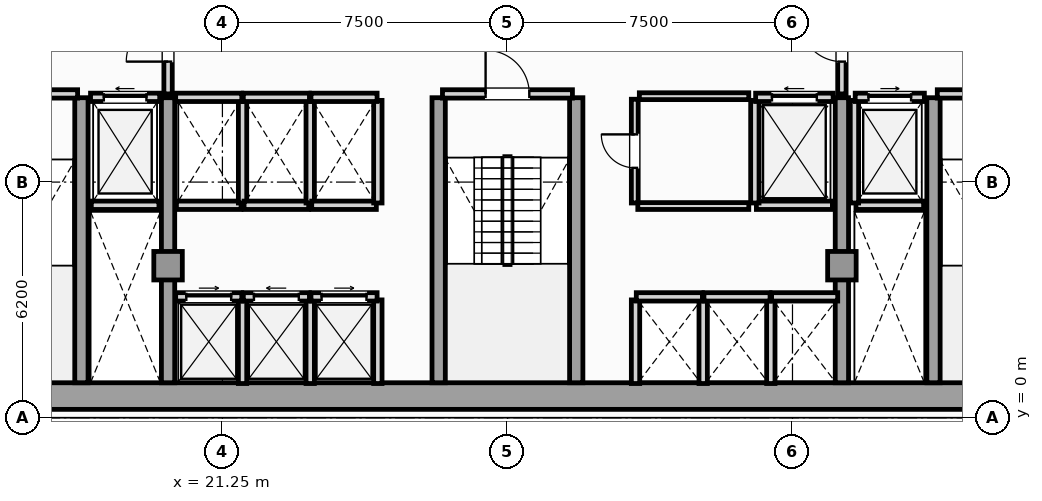
"""IFC4 building model, lengths in metres.
Left out: names, types, materials, properties, quantities, classifications, styles, units other than length and angle.
Written with IfcOpenShell. Run it as: python <this file> out.ifc"""

import sys

from ifc_helpers import new_model, si_unit, direction, frame, frame_2d, origin, origin_2d, place, context, subcontext, project, spatial, rectangle, extrude, element, fill, save


model = new_model("IFC4")
c1 = context("Model", 3, precision=1e-05, world=origin(), true_north=direction((0.0, 1.0)))
c2 = subcontext(c1, "Body", "Model", "MODEL_VIEW")
j1 = project(units=[si_unit("LENGTHUNIT", "METRE"), si_unit("PLANEANGLEUNIT", "RADIAN")], contexts=[c1])
p1 = place(None, origin())
s1 = spatial("IfcSite", under=j1, at=p1, CompositionType="ELEMENT")
p2 = place(p1, origin())
s2 = spatial("IfcBuilding", under=s1, at=p2, CompositionType="ELEMENT")
p3 = place(p2, frame((0.0, 0.0, 92.6)))
s3 = spatial("IfcBuildingStorey", under=s2, at=p3, CompositionType="ELEMENT", Elevation=92.6)
p4 = place(p3, frame((13.25, 0.57, 0.0), z_axis=(0.0, 0.0, 1.0), x_axis=(1.0, 0.0, 0.0)))
e1 = element("IfcWall", 1, at=p4, inside=s3, PredefinedType="SHEAR", context=c2, shape_type="SweptSolid", body=[
    extrude(rectangle(XDim=31.0, YDim=0.7, at=frame_2d((15.5, 0.0))), origin(), (0.0, 0.0, 1.0), 3.6),
])
for number, where, z_axis, x_axis in (
    (2, (17.54, 0.92, 0.0), (0.0, 0.0, 1.0), (0.0, 1.0, 0.0)),
    (3, (19.82, 0.92, 0.0), (0.0, 0.0, 1.0), (0.0, 1.0, 0.0)),
    (4, (26.94, 0.92, 0.0), (0.0, 0.0, 1.0), (0.0, 1.0, 0.0)),
    (5, (30.56, 0.92, 0.0), (0.0, 0.0, 1.0), (0.0, 1.0, 0.0)),
    (6, (37.55, 0.92, 0.0), (0.0, 0.0, 1.0), (0.0, 1.0, 0.0)),
    (7, (39.96, 0.92, 0.0), (0.0, 0.0, 1.0), (0.0, 1.0, 0.0)),
):
    element("IfcWall", number, at=place(p3, frame(where, z_axis=z_axis, x_axis=x_axis)), inside=s3, PredefinedType="SHEAR", context=c2, shape_type="SweptSolid", body=[
        extrude(rectangle(XDim=7.5, YDim=0.35, at=frame_2d((3.75, 0.0))), origin(), (0.0, 0.0, 1.0), 3.6),
    ])
for number, where, z_axis, x_axis in (
    (8, (19.82, 4.0, 0.0), (0.0, 0.0, 1.0), (1.0, 0.0, 0.0)),
    (9, (37.55, 4.0, 0.0), (0.0, 0.0, 1.0), (1.0, 0.0, 0.0)),
):
    element("IfcColumn", number, at=place(p3, frame(where, z_axis=z_axis, x_axis=x_axis)), inside=s3, PredefinedType="COLUMN", context=c2, shape_type="SweptSolid", body=[
        extrude(rectangle(XDim=0.75, YDim=0.75, at=origin_2d()), origin(), (0.0, 0.0, 1.0), 3.85),
    ])
p5 = place(p3, frame((17.8, 5.59, 0.0), z_axis=(0.0, 0.0, 1.0), x_axis=(1.0, 0.0, 0.0)))
e10 = element("IfcWall", 10, at=p5, inside=s3, PredefinedType="SOLIDWALL", context=c2, shape_type="SweptSolid", body=[
    extrude(rectangle(XDim=1.78, YDim=0.22, at=frame_2d((0.89, 0.0))), origin(), (0.0, 0.0, 1.0), 3.6),
])
p6 = place(p3, frame((17.78, 8.43, 0.0), z_axis=(0.0, 0.0, 1.0), x_axis=(1.0, 0.0, 0.0)))
e11 = element("IfcWall", 11, at=p6, inside=s3, PredefinedType="SOLIDWALL", context=c2, shape_type="SweptSolid", body=[
    extrude(rectangle(XDim=1.82, YDim=0.22, at=frame_2d((0.91, 0.0))), origin(), (0.0, 0.0, 1.0), 3.6),
])
p7 = place(p6, frame((0.35, 0.0, 0.0)))
e12 = element("IfcOpeningElement", 12, at=p7, cuts=e11, PredefinedType="OPENING", context=c2, shape_type="SweptSolid", body=[
    extrude(rectangle(XDim=1.12, YDim=2.25, at=frame_2d((0.56, 1.125))), frame((0.0, 0.12, 0.0), z_axis=(0.0, -1.0, 0.0), x_axis=(1.0, 0.0, 0.0)), (0.0, 0.0, 1.0), 0.24),
])
p8 = place(p3, frame((37.92, 5.59, 0.0), z_axis=(0.0, 0.0, 1.0), x_axis=(1.0, 0.0, 0.0)))
e13 = element("IfcWall", 13, at=p8, inside=s3, PredefinedType="SOLIDWALL", context=c2, shape_type="SweptSolid", body=[
    extrude(rectangle(XDim=1.78, YDim=0.22, at=frame_2d((0.89, 0.0))), origin(), (0.0, 0.0, 1.0), 3.6),
])
p9 = place(p3, frame((37.88, 5.65, 0.0), z_axis=(0.0, 0.0, 1.0), x_axis=(0.0, 1.0, 0.0)))
e14 = element("IfcWall", 14, at=p9, inside=s3, PredefinedType="SOLIDWALL", context=c2, shape_type="SweptSolid", body=[
    extrude(rectangle(XDim=2.7, YDim=0.22, at=frame_2d((1.35, 0.0))), origin(), (0.0, 0.0, 1.0), 3.6),
])
p10 = place(p3, frame((37.9, 8.43, 0.0), z_axis=(0.0, 0.0, 1.0), x_axis=(1.0, 0.0, 0.0)))
e15 = element("IfcWall", 15, at=p10, inside=s3, PredefinedType="SOLIDWALL", context=c2, shape_type="SweptSolid", body=[
    extrude(rectangle(XDim=1.82, YDim=0.22, at=frame_2d((0.91, 0.0))), origin(), (0.0, 0.0, 1.0), 3.6),
])
p11 = place(p10, frame((0.35, 0.0, 0.0)))
e16 = element("IfcOpeningElement", 16, at=p11, cuts=e15, PredefinedType="OPENING", context=c2, shape_type="SweptSolid", body=[
    extrude(rectangle(XDim=1.12, YDim=2.25, at=frame_2d((0.56, 1.125))), frame((0.0, 0.12, 0.0), z_axis=(0.0, -1.0, 0.0), x_axis=(1.0, 0.0, 0.0)), (0.0, 0.0, 1.0), 0.24),
])
p12 = place(p3, frame((35.3, 5.59, 0.0), z_axis=(0.0, 0.0, 1.0), x_axis=(1.0, 0.0, 0.0)))
e17 = element("IfcWall", 17, at=p12, inside=s3, PredefinedType="SOLIDWALL", context=c2, shape_type="SweptSolid", body=[
    extrude(rectangle(XDim=2.0, YDim=0.22, at=frame_2d((1.0, 0.0))), origin(), (0.0, 0.0, 1.0), 3.6),
])
p13 = place(p3, frame((35.26, 5.65, 0.0), z_axis=(0.0, 0.0, 1.0), x_axis=(0.0, 1.0, 0.0)))
e18 = element("IfcWall", 18, at=p13, inside=s3, PredefinedType="SOLIDWALL", context=c2, shape_type="SweptSolid", body=[
    extrude(rectangle(XDim=2.7, YDim=0.22, at=frame_2d((1.35, 0.0))), origin(), (0.0, 0.0, 1.0), 3.6),
])
p14 = place(p3, frame((35.28, 8.43, 0.0), z_axis=(0.0, 0.0, 1.0), x_axis=(1.0, 0.0, 0.0)))
e19 = element("IfcWall", 19, at=p14, inside=s3, PredefinedType="SOLIDWALL", context=c2, shape_type="SweptSolid", body=[
    extrude(rectangle(XDim=2.04, YDim=0.22, at=frame_2d((1.02, 0.0))), origin(), (0.0, 0.0, 1.0), 3.6),
])
p15 = place(p14, frame((0.43, 0.0, 0.0)))
e20 = element("IfcOpeningElement", 20, at=p15, cuts=e19, PredefinedType="OPENING", context=c2, shape_type="SweptSolid", body=[
    extrude(rectangle(XDim=1.18, YDim=2.2, at=frame_2d((0.59, 1.1))), frame((0.0, 0.12, 0.0), z_axis=(0.0, -1.0, 0.0), x_axis=(1.0, 0.0, 0.0)), (0.0, 0.0, 1.0), 0.24),
])
p16 = place(p3, frame((21.78, 0.9, 0.0), z_axis=(0.0, 0.0, 1.0), x_axis=(0.0, 1.0, 0.0)))
e21 = element("IfcWall", 21, at=p16, inside=s3, PredefinedType="SOLIDWALL", context=c2, shape_type="SweptSolid", body=[
    extrude(rectangle(XDim=2.2, YDim=0.22, at=frame_2d((1.1, 0.0))), origin(), (0.0, 0.0, 1.0), 3.6),
])
p17 = place(p3, frame((20.02, 3.18, 0.0), z_axis=(0.0, 0.0, 1.0), x_axis=(1.0, 0.0, 0.0)))
e22 = element("IfcWall", 22, at=p17, inside=s3, PredefinedType="SOLIDWALL", context=c2, shape_type="SweptSolid", body=[
    extrude(rectangle(XDim=1.74, YDim=0.22, at=frame_2d((0.87, 0.0))), origin(), (0.0, 0.0, 1.0), 3.6),
])
p18 = place(p17, frame((0.28, 0.0, 0.0)))
e23 = element("IfcOpeningElement", 23, at=p18, cuts=e22, PredefinedType="OPENING", context=c2, shape_type="SweptSolid", body=[
    extrude(rectangle(XDim=1.18, YDim=2.2, at=frame_2d((0.59, 1.1))), frame((0.0, 0.12, 0.0), z_axis=(0.0, -1.0, 0.0), x_axis=(1.0, 0.0, 0.0)), (0.0, 0.0, 1.0), 0.24),
])
p19 = place(p3, frame((23.56, 0.9, 0.0), z_axis=(0.0, 0.0, 1.0), x_axis=(0.0, 1.0, 0.0)))
e24 = element("IfcWall", 24, at=p19, inside=s3, PredefinedType="SOLIDWALL", context=c2, shape_type="SweptSolid", body=[
    extrude(rectangle(XDim=2.2, YDim=0.22, at=frame_2d((1.1, 0.0))), origin(), (0.0, 0.0, 1.0), 3.6),
])
p20 = place(p3, frame((21.8, 3.18, 0.0), z_axis=(0.0, 0.0, 1.0), x_axis=(1.0, 0.0, 0.0)))
e25 = element("IfcWall", 25, at=p20, inside=s3, PredefinedType="SOLIDWALL", context=c2, shape_type="SweptSolid", body=[
    extrude(rectangle(XDim=1.74, YDim=0.22, at=frame_2d((0.87, 0.0))), origin(), (0.0, 0.0, 1.0), 3.6),
])
p21 = place(p20, frame((0.28, 0.0, 0.0)))
e26 = element("IfcOpeningElement", 26, at=p21, cuts=e25, PredefinedType="OPENING", context=c2, shape_type="SweptSolid", body=[
    extrude(rectangle(XDim=1.18, YDim=2.2, at=frame_2d((0.59, 1.1))), frame((0.0, 0.12, 0.0), z_axis=(0.0, -1.0, 0.0), x_axis=(1.0, 0.0, 0.0)), (0.0, 0.0, 1.0), 0.24),
])
p22 = place(p3, frame((25.34, 0.9, 0.0), z_axis=(0.0, 0.0, 1.0), x_axis=(0.0, 1.0, 0.0)))
e27 = element("IfcWall", 27, at=p22, inside=s3, PredefinedType="SOLIDWALL", context=c2, shape_type="SweptSolid", body=[
    extrude(rectangle(XDim=2.2, YDim=0.22, at=frame_2d((1.1, 0.0))), origin(), (0.0, 0.0, 1.0), 3.6),
])
p23 = place(p3, frame((23.58, 3.18, 0.0), z_axis=(0.0, 0.0, 1.0), x_axis=(1.0, 0.0, 0.0)))
e28 = element("IfcWall", 28, at=p23, inside=s3, PredefinedType="SOLIDWALL", context=c2, shape_type="SweptSolid", body=[
    extrude(rectangle(XDim=1.74, YDim=0.22, at=frame_2d((0.87, 0.0))), origin(), (0.0, 0.0, 1.0), 3.6),
])
p24 = place(p23, frame((0.28, 0.0, 0.0)))
e29 = element("IfcOpeningElement", 29, at=p24, cuts=e28, PredefinedType="OPENING", context=c2, shape_type="SweptSolid", body=[
    extrude(rectangle(XDim=1.18, YDim=2.2, at=frame_2d((0.59, 1.1))), frame((0.0, 0.12, 0.0), z_axis=(0.0, -1.0, 0.0), x_axis=(1.0, 0.0, 0.0)), (0.0, 0.0, 1.0), 0.24),
])
for number, where, z_axis, x_axis in (
    (30, (32.12, 0.9, 0.0), (0.0, 0.0, 1.0), (0.0, 1.0, 0.0)),
    (31, (33.9, 0.9, 0.0), (0.0, 0.0, 1.0), (0.0, 1.0, 0.0)),
):
    element("IfcWall", number, at=place(p3, frame(where, z_axis=z_axis, x_axis=x_axis)), inside=s3, PredefinedType="SOLIDWALL", context=c2, shape_type="SweptSolid", body=[
        extrude(rectangle(XDim=2.2, YDim=0.22, at=frame_2d((1.1, 0.0))), origin(), (0.0, 0.0, 1.0), 3.6),
    ])
p25 = place(p3, frame((32.14, 3.18, 0.0), z_axis=(0.0, 0.0, 1.0), x_axis=(1.0, 0.0, 0.0)))
e32 = element("IfcWall", 32, at=p25, inside=s3, PredefinedType="SOLIDWALL", context=c2, shape_type="SweptSolid", body=[
    extrude(rectangle(XDim=1.74, YDim=0.22, at=frame_2d((0.87, 0.0))), origin(), (0.0, 0.0, 1.0), 3.6),
])
p26 = place(p3, frame((35.68, 0.9, 0.0), z_axis=(0.0, 0.0, 1.0), x_axis=(0.0, 1.0, 0.0)))
e33 = element("IfcWall", 33, at=p26, inside=s3, PredefinedType="SOLIDWALL", context=c2, shape_type="SweptSolid", body=[
    extrude(rectangle(XDim=2.2, YDim=0.22, at=frame_2d((1.1, 0.0))), origin(), (0.0, 0.0, 1.0), 3.6),
])
for number, where, z_axis, x_axis in (
    (34, (33.92, 3.18, 0.0), (0.0, 0.0, 1.0), (1.0, 0.0, 0.0)),
    (35, (35.7, 3.18, 0.0), (0.0, 0.0, 1.0), (1.0, 0.0, 0.0)),
):
    element("IfcWall", number, at=place(p3, frame(where, z_axis=z_axis, x_axis=x_axis)), inside=s3, PredefinedType="SOLIDWALL", context=c2, shape_type="SweptSolid", body=[
        extrude(rectangle(XDim=1.74, YDim=0.22, at=frame_2d((0.87, 0.0))), origin(), (0.0, 0.0, 1.0), 3.6),
    ])
p27 = place(p3, frame((20.04, 5.59, 0.0), z_axis=(0.0, 0.0, 1.0), x_axis=(1.0, 0.0, 0.0)))
e36 = element("IfcWall", 36, at=p27, inside=s3, PredefinedType="SOLIDWALL", context=c2, shape_type="SweptSolid", body=[
    extrude(rectangle(XDim=1.7, YDim=0.22, at=frame_2d((0.85, 0.0))), origin(), (0.0, 0.0, 1.0), 3.6),
])
p28 = place(p3, frame((21.78, 5.65, 0.0), z_axis=(0.0, 0.0, 1.0), x_axis=(0.0, 1.0, 0.0)))
e37 = element("IfcWall", 37, at=p28, inside=s3, PredefinedType="SOLIDWALL", context=c2, shape_type="SweptSolid", body=[
    extrude(rectangle(XDim=2.7, YDim=0.22, at=frame_2d((1.35, 0.0))), origin(), (0.0, 0.0, 1.0), 3.6),
])
p29 = place(p3, frame((20.02, 8.43, 0.0), z_axis=(0.0, 0.0, 1.0), x_axis=(1.0, 0.0, 0.0)))
e38 = element("IfcWall", 38, at=p29, inside=s3, PredefinedType="SOLIDWALL", context=c2, shape_type="SweptSolid", body=[
    extrude(rectangle(XDim=1.74, YDim=0.22, at=frame_2d((0.87, 0.0))), origin(), (0.0, 0.0, 1.0), 3.6),
])
p30 = place(p3, frame((21.82, 5.59, 0.0), z_axis=(0.0, 0.0, 1.0), x_axis=(1.0, 0.0, 0.0)))
e39 = element("IfcWall", 39, at=p30, inside=s3, PredefinedType="SOLIDWALL", context=c2, shape_type="SweptSolid", body=[
    extrude(rectangle(XDim=1.7, YDim=0.22, at=frame_2d((0.85, 0.0))), origin(), (0.0, 0.0, 1.0), 3.6),
])
p31 = place(p3, frame((23.56, 5.65, 0.0), z_axis=(0.0, 0.0, 1.0), x_axis=(0.0, 1.0, 0.0)))
e40 = element("IfcWall", 40, at=p31, inside=s3, PredefinedType="SOLIDWALL", context=c2, shape_type="SweptSolid", body=[
    extrude(rectangle(XDim=2.7, YDim=0.22, at=frame_2d((1.35, 0.0))), origin(), (0.0, 0.0, 1.0), 3.6),
])
p32 = place(p3, frame((21.8, 8.43, 0.0), z_axis=(0.0, 0.0, 1.0), x_axis=(1.0, 0.0, 0.0)))
e41 = element("IfcWall", 41, at=p32, inside=s3, PredefinedType="SOLIDWALL", context=c2, shape_type="SweptSolid", body=[
    extrude(rectangle(XDim=1.74, YDim=0.22, at=frame_2d((0.87, 0.0))), origin(), (0.0, 0.0, 1.0), 3.6),
])
p33 = place(p3, frame((23.6, 5.59, 0.0), z_axis=(0.0, 0.0, 1.0), x_axis=(1.0, 0.0, 0.0)))
e42 = element("IfcWall", 42, at=p33, inside=s3, PredefinedType="SOLIDWALL", context=c2, shape_type="SweptSolid", body=[
    extrude(rectangle(XDim=1.7, YDim=0.22, at=frame_2d((0.85, 0.0))), origin(), (0.0, 0.0, 1.0), 3.6),
])
p34 = place(p3, frame((25.34, 5.65, 0.0), z_axis=(0.0, 0.0, 1.0), x_axis=(0.0, 1.0, 0.0)))
e43 = element("IfcWall", 43, at=p34, inside=s3, PredefinedType="SOLIDWALL", context=c2, shape_type="SweptSolid", body=[
    extrude(rectangle(XDim=2.7, YDim=0.22, at=frame_2d((1.35, 0.0))), origin(), (0.0, 0.0, 1.0), 3.6),
])
p35 = place(p3, frame((23.58, 8.43, 0.0), z_axis=(0.0, 0.0, 1.0), x_axis=(1.0, 0.0, 0.0)))
e44 = element("IfcWall", 44, at=p35, inside=s3, PredefinedType="SOLIDWALL", context=c2, shape_type="SweptSolid", body=[
    extrude(rectangle(XDim=1.74, YDim=0.22, at=frame_2d((0.87, 0.0))), origin(), (0.0, 0.0, 1.0), 3.6),
])
p36 = place(p3, frame((14.04, 8.52, 0.0), z_axis=(0.0, 0.0, 1.0), x_axis=(1.0, 0.0, 0.0)))
e45 = element("IfcWall", 45, at=p36, inside=s3, PredefinedType="SOLIDWALL", context=c2, shape_type="SweptSolid", body=[
    extrude(rectangle(XDim=3.4, YDim=0.22, at=frame_2d((1.7, 0.0))), origin(), (0.0, 0.0, 1.0), 3.6),
])
p37 = place(p36, frame((1.125, 0.0, 0.0)))
e46 = element("IfcOpeningElement", 46, at=p37, cuts=e45, PredefinedType="OPENING", context=c2, shape_type="SweptSolid", body=[
    extrude(rectangle(XDim=1.15, YDim=2.2, at=frame_2d((0.575, 1.1))), frame((0.0, 0.12, 0.0), z_axis=(0.0, -1.0, 0.0), x_axis=(1.0, 0.0, 0.0)), (0.0, 0.0, 1.0), 0.24),
])
p38 = place(p3, frame((40.06, 8.52, 0.0), z_axis=(0.0, 0.0, 1.0), x_axis=(1.0, 0.0, 0.0)))
e47 = element("IfcWall", 47, at=p38, inside=s3, PredefinedType="SOLIDWALL", context=c2, shape_type="SweptSolid", body=[
    extrude(rectangle(XDim=3.4, YDim=0.22, at=frame_2d((1.7, 0.0))), origin(), (0.0, 0.0, 1.0), 3.6),
])
p39 = place(p38, frame((1.125, 0.0, 0.0)))
e48 = element("IfcOpeningElement", 48, at=p39, cuts=e47, PredefinedType="OPENING", context=c2, shape_type="SweptSolid", body=[
    extrude(rectangle(XDim=1.15, YDim=2.2, at=frame_2d((0.575, 1.1))), frame((0.0, 0.12, 0.0), z_axis=(0.0, -1.0, 0.0), x_axis=(1.0, 0.0, 0.0)), (0.0, 0.0, 1.0), 0.24),
])
p40 = place(p3, frame((27.04, 8.52, 0.0), z_axis=(0.0, 0.0, 1.0), x_axis=(1.0, 0.0, 0.0)))
e49 = element("IfcWall", 49, at=p40, inside=s3, PredefinedType="SOLIDWALL", context=c2, shape_type="SweptSolid", body=[
    extrude(rectangle(XDim=3.42, YDim=0.22, at=frame_2d((1.71, 0.0))), origin(), (0.0, 0.0, 1.0), 3.6),
])
p41 = place(p40, frame((1.135, 0.0, 0.0)))
e50 = element("IfcOpeningElement", 50, at=p41, cuts=e49, PredefinedType="OPENING", context=c2, shape_type="SweptSolid", body=[
    extrude(rectangle(XDim=1.15, YDim=2.2, at=frame_2d((0.575, 1.1))), frame((0.0, 0.12, 0.0), z_axis=(0.0, -1.0, 0.0), x_axis=(1.0, 0.0, 0.0)), (0.0, 0.0, 1.0), 0.24),
])
p42 = place(p3, frame((19.82, 8.52, 0.0), z_axis=(0.0, 0.0, 1.0), x_axis=(0.0, 1.0, 0.0)))
e51 = element("IfcWall", 51, at=p42, inside=s3, PredefinedType="SOLIDWALL", context=c2, shape_type="SweptSolid", body=[
    extrude(rectangle(XDim=2.8, YDim=0.22, at=frame_2d((1.4, 0.0))), origin(), (0.0, 0.0, 1.0), 3.055),
])
p43 = place(p42, frame((0.85, 0.0, 0.0)))
e52 = element("IfcOpeningElement", 52, at=p43, cuts=e51, PredefinedType="OPENING", context=c2, shape_type="SweptSolid", body=[
    extrude(rectangle(XDim=1.1, YDim=2.2, at=frame_2d((0.55, 1.1))), frame((0.0, 0.12, 0.0), z_axis=(0.0, -1.0, 0.0), x_axis=(1.0, 0.0, 0.0)), (0.0, 0.0, 1.0), 0.24),
])
p44 = place(p3, frame((37.55, 8.52, 0.0), z_axis=(0.0, 0.0, 1.0), x_axis=(0.0, 1.0, 0.0)))
e53 = element("IfcWall", 53, at=p44, inside=s3, PredefinedType="SOLIDWALL", context=c2, shape_type="SweptSolid", body=[
    extrude(rectangle(XDim=2.8, YDim=0.22, at=frame_2d((1.4, 0.0))), origin(), (0.0, 0.0, 1.0), 3.055),
])
p45 = place(p44, frame((0.85, 0.0, 0.0)))
e54 = element("IfcOpeningElement", 54, at=p45, cuts=e53, PredefinedType="OPENING", context=c2, shape_type="SweptSolid", body=[
    extrude(rectangle(XDim=1.1, YDim=2.2, at=frame_2d((0.55, 1.1))), frame((0.0, 0.12, 0.0), z_axis=(0.0, -1.0, 0.0), x_axis=(1.0, 0.0, 0.0)), (0.0, 0.0, 1.0), 0.24),
])
p46 = place(p3, frame((32.1, 5.65, 0.0), z_axis=(0.0, 0.0, 1.0), x_axis=(0.0, 1.0, 0.0)))
e55 = element("IfcWall", 55, at=p46, inside=s3, PredefinedType="PARTITIONING", context=c2, shape_type="SweptSolid", body=[
    extrude(rectangle(XDim=2.73, YDim=0.18, at=frame_2d((1.365, 0.0))), origin(), (0.0, 0.0, 1.0), 3.6),
])
p47 = place(p46, frame((0.925, 0.0, 0.0)))
e56 = element("IfcOpeningElement", 56, at=p47, cuts=e55, PredefinedType="OPENING", context=c2, shape_type="SweptSolid", body=[
    extrude(rectangle(XDim=0.88, YDim=2.05, at=frame_2d((0.44, 1.025))), frame((0.0, 0.1, 0.0), z_axis=(0.0, -1.0, 0.0), x_axis=(1.0, 0.0, 0.0)), (0.0, 0.0, 1.0), 0.2),
])
p48 = place(p3, frame((32.22, 8.46, 0.0), z_axis=(0.0, 0.0, 1.0), x_axis=(1.0, 0.0, 0.0)))
e57 = element("IfcWall", 57, at=p48, inside=s3, PredefinedType="PARTITIONING", context=c2, shape_type="SweptSolid", body=[
    extrude(rectangle(XDim=2.88, YDim=0.18, at=frame_2d((1.44, 0.0))), origin(), (0.0, 0.0, 1.0), 3.6),
])
p49 = place(p3, frame((32.18, 5.57, 0.0), z_axis=(0.0, 0.0, 1.0), x_axis=(1.0, 0.0, 0.0)))
e58 = element("IfcWall", 58, at=p49, inside=s3, PredefinedType="PARTITIONING", context=c2, shape_type="SweptSolid", body=[
    extrude(rectangle(XDim=2.92, YDim=0.18, at=frame_2d((1.46, 0.0))), origin(), (0.0, 0.0, 1.0), 3.6),
])
p50 = place(p7, origin())
e59 = element("IfcDoor", 59, at=p50, inside=s3, OperationType="SLIDING_TO_LEFT", PredefinedType="DOOR", context=c2, shape_type="SweptSolid", body=[
    extrude(rectangle(XDim=1.12, YDim=2.25, at=frame_2d((0.56, 1.125))), frame((0.0, 0.025, 0.0), z_axis=(0.0, -1.0, 0.0), x_axis=(1.0, 0.0, 0.0)), (0.0, 0.0, 1.0), 0.05),
])
fill(e12, e59)
p51 = place(p11, origin())
e60 = element("IfcDoor", 60, at=p51, inside=s3, OperationType="SLIDING_TO_RIGHT", PredefinedType="DOOR", context=c2, shape_type="SweptSolid", body=[
    extrude(rectangle(XDim=1.12, YDim=2.25, at=frame_2d((0.56, 1.125))), frame((0.0, 0.025, 0.0), z_axis=(0.0, -1.0, 0.0), x_axis=(1.0, 0.0, 0.0)), (0.0, 0.0, 1.0), 0.05),
])
fill(e16, e60)
p52 = place(p15, origin())
e61 = element("IfcDoor", 61, at=p52, inside=s3, OperationType="SLIDING_TO_LEFT", PredefinedType="DOOR", context=c2, shape_type="SweptSolid", body=[
    extrude(rectangle(XDim=1.18, YDim=2.2, at=frame_2d((0.59, 1.1))), frame((0.0, 0.025, 0.0), z_axis=(0.0, -1.0, 0.0), x_axis=(1.0, 0.0, 0.0)), (0.0, 0.0, 1.0), 0.05),
])
fill(e20, e61)
p53 = place(p18, origin())
e62 = element("IfcDoor", 62, at=p53, inside=s3, OperationType="SLIDING_TO_RIGHT", PredefinedType="DOOR", context=c2, shape_type="SweptSolid", body=[
    extrude(rectangle(XDim=1.18, YDim=2.2, at=frame_2d((0.59, 1.1))), frame((0.0, 0.025, 0.0), z_axis=(0.0, -1.0, 0.0), x_axis=(1.0, 0.0, 0.0)), (0.0, 0.0, 1.0), 0.05),
])
fill(e23, e62)
p54 = place(p21, origin())
e63 = element("IfcDoor", 63, at=p54, inside=s3, OperationType="SLIDING_TO_LEFT", PredefinedType="DOOR", context=c2, shape_type="SweptSolid", body=[
    extrude(rectangle(XDim=1.18, YDim=2.2, at=frame_2d((0.59, 1.1))), frame((0.0, 0.025, 0.0), z_axis=(0.0, -1.0, 0.0), x_axis=(1.0, 0.0, 0.0)), (0.0, 0.0, 1.0), 0.05),
])
fill(e26, e63)
p55 = place(p24, origin())
e64 = element("IfcDoor", 64, at=p55, inside=s3, OperationType="SLIDING_TO_RIGHT", PredefinedType="DOOR", context=c2, shape_type="SweptSolid", body=[
    extrude(rectangle(XDim=1.18, YDim=2.2, at=frame_2d((0.59, 1.1))), frame((0.0, 0.025, 0.0), z_axis=(0.0, -1.0, 0.0), x_axis=(1.0, 0.0, 0.0)), (0.0, 0.0, 1.0), 0.05),
])
fill(e29, e64)
p56 = place(p41, origin())
e65 = element("IfcDoor", 65, at=p56, inside=s3, OperationType="SINGLE_SWING_LEFT", PredefinedType="DOOR", context=c2, shape_type="SweptSolid", body=[
    extrude(rectangle(XDim=1.15, YDim=2.2, at=frame_2d((0.575, 1.1))), frame((0.0, 0.025, 0.0), z_axis=(0.0, -1.0, 0.0), x_axis=(1.0, 0.0, 0.0)), (0.0, 0.0, 1.0), 0.05),
])
fill(e50, e65)
p57 = place(p43, origin())
e66 = element("IfcDoor", 66, at=p57, inside=s3, OperationType="SINGLE_SWING_LEFT", PredefinedType="DOOR", context=c2, shape_type="SweptSolid", body=[
    extrude(rectangle(XDim=1.1, YDim=2.2, at=frame_2d((0.55, 1.1))), frame((0.0, 0.025, 0.0), z_axis=(0.0, -1.0, 0.0), x_axis=(1.0, 0.0, 0.0)), (0.0, 0.0, 1.0), 0.05),
])
fill(e52, e66)
p58 = place(p45, origin())
e67 = element("IfcDoor", 67, at=p58, inside=s3, OperationType="SINGLE_SWING_RIGHT", PredefinedType="DOOR", context=c2, shape_type="SweptSolid", body=[
    extrude(rectangle(XDim=1.1, YDim=2.2, at=frame_2d((0.55, 1.1))), frame((0.0, 0.025, 0.0), z_axis=(0.0, -1.0, 0.0), x_axis=(1.0, 0.0, 0.0)), (0.0, 0.0, 1.0), 0.05),
])
fill(e54, e67)
p59 = place(p47, origin())
e68 = element("IfcDoor", 68, at=p59, inside=s3, OperationType="SINGLE_SWING_RIGHT", PredefinedType="DOOR", context=c2, shape_type="SweptSolid", body=[
    extrude(rectangle(XDim=0.88, YDim=2.05, at=frame_2d((0.44, 1.025))), frame((0.0, 0.025, 0.0), z_axis=(0.0, -1.0, 0.0), x_axis=(1.0, 0.0, 0.0)), (0.0, 0.0, 1.0), 0.05),
])
fill(e56, e68)
save(model, sys.argv[1])
